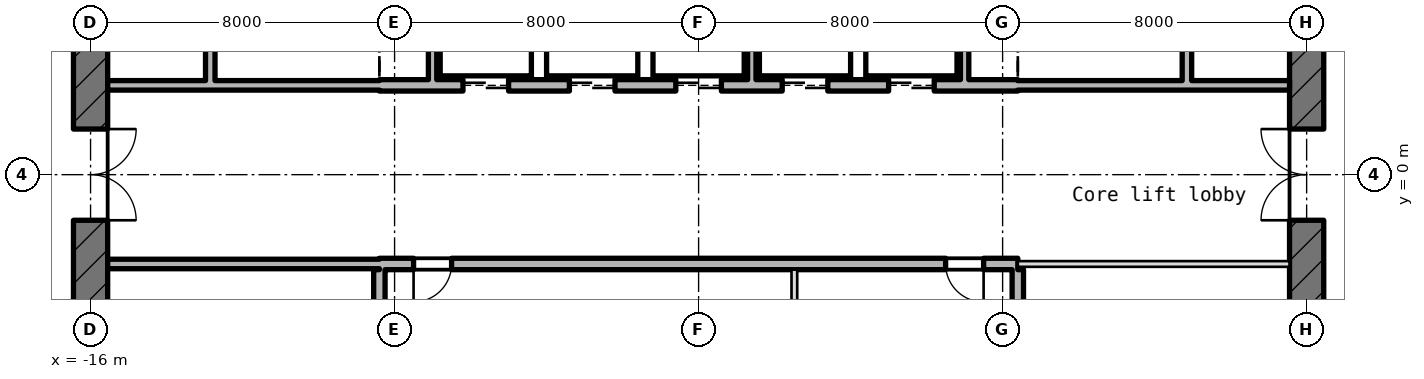
"""IFC4 building model, lengths in metres.
Left out: names, types, materials, properties, quantities, classifications, styles, units other than length and angle.
Written with IfcOpenShell. Run it as: python <this file> out.ifc"""

import sys

from ifc_helpers import new_model, si_unit, direction, frame, frame_2d, origin, place, context, subcontext, project, spatial, rectangle, extrude, element, fill, save


model = new_model("IFC4")
c1 = context("Model", 3, precision=1e-05, world=origin(), true_north=direction((0.0, 1.0)))
c2 = subcontext(c1, "Body", "Model", "MODEL_VIEW")
j1 = project(units=[si_unit("LENGTHUNIT", "METRE"), si_unit("PLANEANGLEUNIT", "RADIAN")], contexts=[c1])
p1 = place(None, origin())
s1 = spatial("IfcSite", under=j1, at=p1, CompositionType="ELEMENT")
p2 = place(p1, origin())
s2 = spatial("IfcBuilding", under=s1, at=p2, CompositionType="ELEMENT")
p3 = place(p2, frame((0.0, 0.0, 235.75)))
s3 = spatial("IfcBuildingStorey", under=s2, at=p3, CompositionType="ELEMENT", Elevation=235.75)
p4 = place(p3, frame((16.0, -10.186, -0.18), z_axis=(0.0, 0.0, 1.0), x_axis=(0.0, 1.0, 0.0)))
e1 = element("IfcWall", 1, at=p4, inside=s3, PredefinedType="SHEAR", context=c2, shape_type="SweptSolid", body=[
    extrude(rectangle(XDim=20.373, YDim=0.9, at=frame_2d((10.186, 0.0))), origin(), (0.0, 0.0, 1.0), 4.15),
])
p5 = place(p4, frame((8.986, 0.0, 0.18)))
e2 = element("IfcOpeningElement", 2, at=p5, cuts=e1, PredefinedType="OPENING", context=c2, shape_type="SweptSolid", body=[
    extrude(rectangle(XDim=2.4, YDim=2.1, at=frame_2d((1.2, 1.05))), frame((0.0, 0.46, 0.0), z_axis=(0.0, -1.0, 0.0), x_axis=(1.0, 0.0, 0.0)), (0.0, 0.0, 1.0), 0.92),
])
p6 = place(p4, frame((13.586, 0.0, 0.18)))
e3 = element("IfcOpeningElement", 3, at=p6, cuts=e1, PredefinedType="OPENING", context=c2, shape_type="SweptSolid", body=[
    extrude(rectangle(XDim=1.2, YDim=2.1, at=frame_2d((0.6, 1.05))), frame((0.0, 0.46, 0.0), z_axis=(0.0, -1.0, 0.0), x_axis=(1.0, 0.0, 0.0)), (0.0, 0.0, 1.0), 0.92),
])
p7 = place(p4, frame((2.4, 0.0, 0.18)))
e4 = element("IfcOpeningElement", 4, at=p7, cuts=e1, PredefinedType="OPENING", context=c2, shape_type="SweptSolid", body=[
    extrude(rectangle(XDim=1.2, YDim=2.1, at=frame_2d((0.6, 1.05))), frame((0.0, 0.46, 0.0), z_axis=(0.0, -1.0, 0.0), x_axis=(1.0, 0.0, 0.0)), (0.0, 0.0, 1.0), 0.92),
])
p8 = place(p3, frame((-16.0, 10.186, -0.18), z_axis=(0.0, 0.0, 1.0), x_axis=(0.0, -1.0, 0.0)))
e5 = element("IfcWall", 5, at=p8, inside=s3, PredefinedType="SHEAR", context=c2, shape_type="SweptSolid", body=[
    extrude(rectangle(XDim=20.373, YDim=0.9, at=frame_2d((10.186, 0.0))), origin(), (0.0, 0.0, 1.0), 4.15),
])
p9 = place(p8, frame((8.986, 0.0, 0.18)))
e6 = element("IfcOpeningElement", 6, at=p9, cuts=e5, PredefinedType="OPENING", context=c2, shape_type="SweptSolid", body=[
    extrude(rectangle(XDim=2.4, YDim=2.1, at=frame_2d((1.2, 1.05))), frame((0.0, 0.46, 0.0), z_axis=(0.0, -1.0, 0.0), x_axis=(1.0, 0.0, 0.0)), (0.0, 0.0, 1.0), 0.92),
])
p10 = place(p8, frame((5.586, 0.0, 0.18)))
e7 = element("IfcOpeningElement", 7, at=p10, cuts=e5, PredefinedType="OPENING", context=c2, shape_type="SweptSolid", body=[
    extrude(rectangle(XDim=1.2, YDim=2.1, at=frame_2d((0.6, 1.05))), frame((0.0, 0.46, 0.0), z_axis=(0.0, -1.0, 0.0), x_axis=(1.0, 0.0, 0.0)), (0.0, 0.0, 1.0), 0.92),
])
p11 = place(p3, frame((-15.55, -2.35, 0.0), z_axis=(0.0, 0.0, 1.0), x_axis=(1.0, 0.0, 0.0)))
e8 = element("IfcWall", 8, at=p11, inside=s3, PredefinedType="STANDARD", context=c2, shape_type="SweptSolid", body=[
    extrude(rectangle(XDim=7.15, YDim=0.25, at=frame_2d((3.575, 0.0))), origin(), (0.0, 0.0, 1.0), 3.97),
])
p12 = place(p3, frame((-8.4, -2.35, -0.18), z_axis=(0.0, 0.0, 1.0), x_axis=(1.0, 0.0, 0.0)))
e9 = element("IfcWall", 9, at=p12, inside=s3, PredefinedType="SHEAR", context=c2, shape_type="SweptSolid", body=[
    extrude(rectangle(XDim=16.8, YDim=0.3, at=frame_2d((8.4, 0.0))), origin(), (0.0, 0.0, 1.0), 4.15),
])
p13 = place(p12, frame((0.9, 0.0, 0.18)))
e10 = element("IfcOpeningElement", 10, at=p13, cuts=e9, PredefinedType="OPENING", context=c2, shape_type="SweptSolid", body=[
    extrude(rectangle(XDim=1.0, YDim=2.1, at=frame_2d((0.5, 1.05))), frame((0.0, 0.16, 0.0), z_axis=(0.0, -1.0, 0.0), x_axis=(1.0, 0.0, 0.0)), (0.0, 0.0, 1.0), 0.32),
])
p14 = place(p12, frame((14.9, 0.0, 0.18)))
e11 = element("IfcOpeningElement", 11, at=p14, cuts=e9, PredefinedType="OPENING", context=c2, shape_type="SweptSolid", body=[
    extrude(rectangle(XDim=1.0, YDim=2.1, at=frame_2d((0.5, 1.05))), frame((0.0, 0.16, 0.0), z_axis=(0.0, -1.0, 0.0), x_axis=(1.0, 0.0, 0.0)), (0.0, 0.0, 1.0), 0.32),
])
p15 = place(p3, frame((8.4, -2.35, 0.0), z_axis=(0.0, 0.0, 1.0), x_axis=(1.0, 0.0, 0.0)))
e12 = element("IfcWall", 12, at=p15, inside=s3, PredefinedType="PARTITIONING", context=c2, shape_type="SweptSolid", body=[
    extrude(rectangle(XDim=7.15, YDim=0.15, at=frame_2d((3.575, 0.0))), origin(), (0.0, 0.0, 1.0), 3.97),
])
p16 = place(p3, frame((-15.55, 2.35, 0.0), z_axis=(0.0, 0.0, 1.0), x_axis=(1.0, 0.0, 0.0)))
e13 = element("IfcWall", 13, at=p16, inside=s3, PredefinedType="STANDARD", context=c2, shape_type="SweptSolid", body=[
    extrude(rectangle(XDim=7.15, YDim=0.25, at=frame_2d((3.575, 0.0))), origin(), (0.0, 0.0, 1.0), 3.97),
])
p17 = place(p3, frame((-8.4, 2.35, -0.18), z_axis=(0.0, 0.0, 1.0), x_axis=(1.0, 0.0, 0.0)))
e14 = element("IfcWall", 14, at=p17, inside=s3, PredefinedType="SHEAR", context=c2, shape_type="SweptSolid", body=[
    extrude(rectangle(XDim=16.8, YDim=0.3, at=frame_2d((8.4, 0.0))), origin(), (0.0, 0.0, 1.0), 4.15),
])
p18 = place(p17, frame((2.2, 0.0, 0.18)))
e15 = element("IfcOpeningElement", 15, at=p18, cuts=e14, PredefinedType="OPENING", context=c2, shape_type="SweptSolid", body=[
    extrude(rectangle(XDim=1.2, YDim=2.1, at=frame_2d((0.6, 1.05))), frame((0.0, 0.16, 0.0), z_axis=(0.0, -1.0, 0.0), x_axis=(1.0, 0.0, 0.0)), (0.0, 0.0, 1.0), 0.32),
])
p19 = place(p17, frame((5.0, 0.0, 0.18)))
e16 = element("IfcOpeningElement", 16, at=p19, cuts=e14, PredefinedType="OPENING", context=c2, shape_type="SweptSolid", body=[
    extrude(rectangle(XDim=1.2, YDim=2.1, at=frame_2d((0.6, 1.05))), frame((0.0, 0.16, 0.0), z_axis=(0.0, -1.0, 0.0), x_axis=(1.0, 0.0, 0.0)), (0.0, 0.0, 1.0), 0.32),
])
p20 = place(p17, frame((7.8, 0.0, 0.18)))
e17 = element("IfcOpeningElement", 17, at=p20, cuts=e14, PredefinedType="OPENING", context=c2, shape_type="SweptSolid", body=[
    extrude(rectangle(XDim=1.2, YDim=2.1, at=frame_2d((0.6, 1.05))), frame((0.0, 0.16, 0.0), z_axis=(0.0, -1.0, 0.0), x_axis=(1.0, 0.0, 0.0)), (0.0, 0.0, 1.0), 0.32),
])
p21 = place(p17, frame((10.6, 0.0, 0.18)))
e18 = element("IfcOpeningElement", 18, at=p21, cuts=e14, PredefinedType="OPENING", context=c2, shape_type="SweptSolid", body=[
    extrude(rectangle(XDim=1.2, YDim=2.1, at=frame_2d((0.6, 1.05))), frame((0.0, 0.16, 0.0), z_axis=(0.0, -1.0, 0.0), x_axis=(1.0, 0.0, 0.0)), (0.0, 0.0, 1.0), 0.32),
])
p22 = place(p17, frame((13.4, 0.0, 0.18)))
e19 = element("IfcOpeningElement", 19, at=p22, cuts=e14, PredefinedType="OPENING", context=c2, shape_type="SweptSolid", body=[
    extrude(rectangle(XDim=1.2, YDim=2.1, at=frame_2d((0.6, 1.05))), frame((0.0, 0.16, 0.0), z_axis=(0.0, -1.0, 0.0), x_axis=(1.0, 0.0, 0.0)), (0.0, 0.0, 1.0), 0.32),
])
p23 = place(p3, frame((8.4, 2.35, 0.0), z_axis=(0.0, 0.0, 1.0), x_axis=(1.0, 0.0, 0.0)))
e20 = element("IfcWall", 20, at=p23, inside=s3, PredefinedType="STANDARD", context=c2, shape_type="SweptSolid", body=[
    extrude(rectangle(XDim=7.15, YDim=0.25, at=frame_2d((3.575, 0.0))), origin(), (0.0, 0.0, 1.0), 3.97),
])
p24 = place(p3, frame((-12.85, 2.475, 0.0), z_axis=(0.0, 0.0, 1.0), x_axis=(0.0, 1.0, 0.0)))
e21 = element("IfcWall", 21, at=p24, inside=s3, PredefinedType="STANDARD", context=c2, shape_type="SweptSolid", body=[
    extrude(rectangle(XDim=3.05, YDim=0.25, at=frame_2d((1.525, 0.0))), origin(), (0.0, 0.0, 1.0), 3.97),
])
p25 = place(p3, frame((-8.4, -8.75, -0.18), z_axis=(0.0, 0.0, 1.0), x_axis=(0.0, 1.0, 0.0)))
e22 = element("IfcWall", 22, at=p25, inside=s3, PredefinedType="SHEAR", context=c2, shape_type="SweptSolid", body=[
    extrude(rectangle(XDim=6.25, YDim=0.3, at=frame_2d((3.125, 0.0))), origin(), (0.0, 0.0, 1.0), 4.15),
])
for number, where, z_axis, x_axis in (
    (23, (-7.0, 2.5, 0.0), (0.0, 0.0, 1.0), (0.0, 1.0, 0.0)),
    (24, (1.4, 2.5, 0.0), (0.0, 0.0, 1.0), (0.0, 1.0, 0.0)),
):
    element("IfcWall", number, at=place(p3, frame(where, z_axis=z_axis, x_axis=x_axis)), inside=s3, PredefinedType="STANDARD", context=c2, shape_type="SweptSolid", body=[
        extrude(rectangle(XDim=2.74, YDim=0.22, at=frame_2d((1.37, 0.0))), origin(), (0.0, 0.0, 1.0), 3.97),
    ])
p26 = place(p3, frame((2.52, -5.24, 0.0), z_axis=(0.0, 0.0, 1.0), x_axis=(0.0, 1.0, 0.0)))
e25 = element("IfcWall", 25, at=p26, inside=s3, PredefinedType="PARTITIONING", context=c2, shape_type="SweptSolid", body=[
    extrude(rectangle(XDim=2.74, YDim=0.15, at=frame_2d((1.37, 0.0))), origin(), (0.0, 0.0, 1.0), 3.97),
])
p27 = place(p3, frame((7.0, 2.5, 0.0), z_axis=(0.0, 0.0, 1.0), x_axis=(0.0, 1.0, 0.0)))
e26 = element("IfcWall", 26, at=p27, inside=s3, PredefinedType="STANDARD", context=c2, shape_type="SweptSolid", body=[
    extrude(rectangle(XDim=2.74, YDim=0.22, at=frame_2d((1.37, 0.0))), origin(), (0.0, 0.0, 1.0), 3.97),
])
p28 = place(p3, frame((8.4, -8.35, -0.18), z_axis=(0.0, 0.0, 1.0), x_axis=(0.0, 1.0, 0.0)))
e27 = element("IfcWall", 27, at=p28, inside=s3, PredefinedType="SHEAR", context=c2, shape_type="SweptSolid", body=[
    extrude(rectangle(XDim=5.85, YDim=0.3, at=frame_2d((2.925, 0.0))), origin(), (0.0, 0.0, 1.0), 4.15),
])
p29 = place(p3, frame((12.85, 2.475, 0.0), z_axis=(0.0, 0.0, 1.0), x_axis=(0.0, 1.0, 0.0)))
e28 = element("IfcWall", 28, at=p29, inside=s3, PredefinedType="STANDARD", context=c2, shape_type="SweptSolid", body=[
    extrude(rectangle(XDim=3.05, YDim=0.25, at=frame_2d((1.525, 0.0))), origin(), (0.0, 0.0, 1.0), 3.97),
])
p30 = place(p18, origin())
e29 = element("IfcDoor", 29, at=p30, inside=s3, OperationType="DOUBLE_DOOR_SLIDING", PredefinedType="DOOR", context=c2, shape_type="SweptSolid", body=[
    extrude(rectangle(XDim=1.2, YDim=2.1, at=frame_2d((0.6, 1.05))), frame((0.0, 0.025, 0.0), z_axis=(0.0, -1.0, 0.0), x_axis=(1.0, 0.0, 0.0)), (0.0, 0.0, 1.0), 0.05),
])
fill(e15, e29)
p31 = place(p19, origin())
e30 = element("IfcDoor", 30, at=p31, inside=s3, OperationType="DOUBLE_DOOR_SLIDING", PredefinedType="DOOR", context=c2, shape_type="SweptSolid", body=[
    extrude(rectangle(XDim=1.2, YDim=2.1, at=frame_2d((0.6, 1.05))), frame((0.0, 0.025, 0.0), z_axis=(0.0, -1.0, 0.0), x_axis=(1.0, 0.0, 0.0)), (0.0, 0.0, 1.0), 0.05),
])
fill(e16, e30)
p32 = place(p20, origin())
e31 = element("IfcDoor", 31, at=p32, inside=s3, OperationType="DOUBLE_DOOR_SLIDING", PredefinedType="DOOR", context=c2, shape_type="SweptSolid", body=[
    extrude(rectangle(XDim=1.2, YDim=2.1, at=frame_2d((0.6, 1.05))), frame((0.0, 0.025, 0.0), z_axis=(0.0, -1.0, 0.0), x_axis=(1.0, 0.0, 0.0)), (0.0, 0.0, 1.0), 0.05),
])
fill(e17, e31)
p33 = place(p21, origin())
e32 = element("IfcDoor", 32, at=p33, inside=s3, OperationType="DOUBLE_DOOR_SLIDING", PredefinedType="DOOR", context=c2, shape_type="SweptSolid", body=[
    extrude(rectangle(XDim=1.2, YDim=2.1, at=frame_2d((0.6, 1.05))), frame((0.0, 0.025, 0.0), z_axis=(0.0, -1.0, 0.0), x_axis=(1.0, 0.0, 0.0)), (0.0, 0.0, 1.0), 0.05),
])
fill(e18, e32)
p34 = place(p22, origin())
e33 = element("IfcDoor", 33, at=p34, inside=s3, OperationType="DOUBLE_DOOR_SLIDING", PredefinedType="DOOR", context=c2, shape_type="SweptSolid", body=[
    extrude(rectangle(XDim=1.2, YDim=2.1, at=frame_2d((0.6, 1.05))), frame((0.0, 0.025, 0.0), z_axis=(0.0, -1.0, 0.0), x_axis=(1.0, 0.0, 0.0)), (0.0, 0.0, 1.0), 0.05),
])
fill(e19, e33)
p35 = place(p9, origin())
e34 = element("IfcDoor", 34, at=p35, inside=s3, OperationType="DOUBLE_DOOR_SINGLE_SWING", PredefinedType="DOOR", context=c2, shape_type="SweptSolid", body=[
    extrude(rectangle(XDim=2.4, YDim=2.1, at=frame_2d((1.2, 1.05))), frame((0.0, 0.025, 0.0), z_axis=(0.0, -1.0, 0.0), x_axis=(1.0, 0.0, 0.0)), (0.0, 0.0, 1.0), 0.05),
])
fill(e6, e34)
p36 = place(p5, origin())
e35 = element("IfcDoor", 35, at=p36, inside=s3, OperationType="DOUBLE_DOOR_SINGLE_SWING", PredefinedType="DOOR", context=c2, shape_type="SweptSolid", body=[
    extrude(rectangle(XDim=2.4, YDim=2.1, at=frame_2d((1.2, 1.05))), frame((0.0, 0.025, 0.0), z_axis=(0.0, -1.0, 0.0), x_axis=(1.0, 0.0, 0.0)), (0.0, 0.0, 1.0), 0.05),
])
fill(e2, e35)
p37 = place(p13, frame((1.0, 0.0, 0.0), z_axis=(0.0, 0.0, 1.0), x_axis=(-1.0, 0.0, 0.0)))
e36 = element("IfcDoor", 36, at=p37, inside=s3, OperationType="SINGLE_SWING_LEFT", PredefinedType="DOOR", context=c2, shape_type="SweptSolid", body=[
    extrude(rectangle(XDim=1.0, YDim=2.1, at=frame_2d((0.5, 1.05))), frame((0.0, 0.025, 0.0), z_axis=(0.0, -1.0, 0.0), x_axis=(1.0, 0.0, 0.0)), (0.0, 0.0, 1.0), 0.05),
])
fill(e10, e36)
p38 = place(p14, frame((1.0, 0.0, 0.0), z_axis=(0.0, 0.0, 1.0), x_axis=(-1.0, 0.0, 0.0)))
e37 = element("IfcDoor", 37, at=p38, inside=s3, OperationType="SINGLE_SWING_LEFT", PredefinedType="DOOR", context=c2, shape_type="SweptSolid", body=[
    extrude(rectangle(XDim=1.0, YDim=2.1, at=frame_2d((0.5, 1.05))), frame((0.0, 0.025, 0.0), z_axis=(0.0, -1.0, 0.0), x_axis=(1.0, 0.0, 0.0)), (0.0, 0.0, 1.0), 0.05),
])
fill(e11, e37)
save(model, sys.argv[1])
